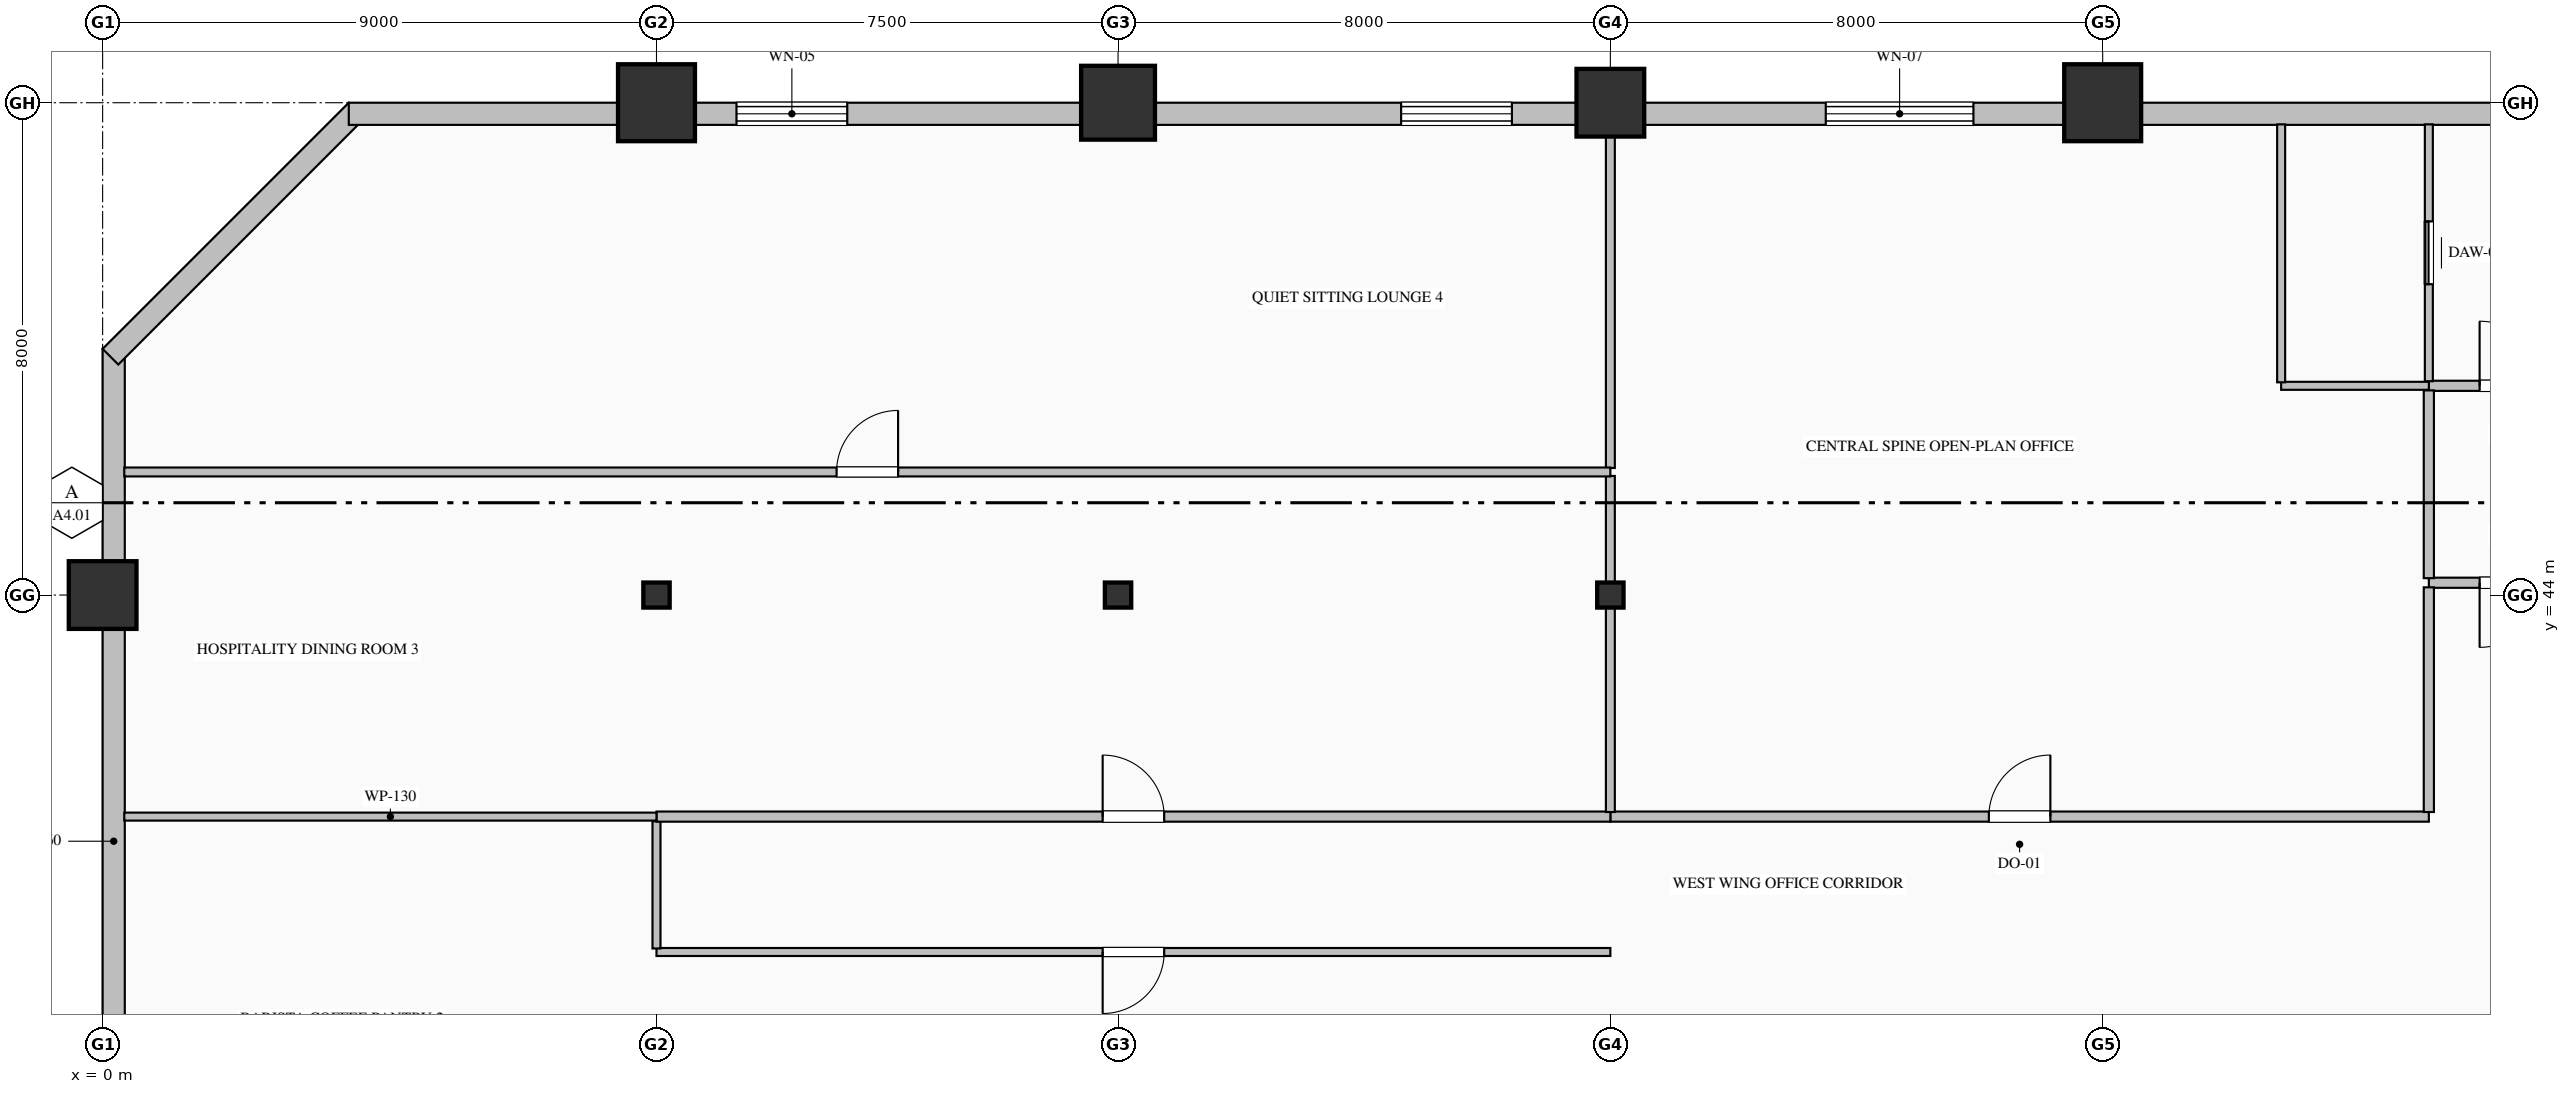
"""IFC4 building model, lengths in metres.
Left out: names, types, materials, properties, quantities, classifications, styles, units other than length and angle.
Written with IfcOpenShell. Run it as: python <this file> out.ifc"""

import sys

from ifc_helpers import new_model, si_unit, direction, frame, frame_2d, origin, origin_2d, place, context, subcontext, project, spatial, rectangle, hollow_rectangle, hollow_circle, i_section, extrude, element, fill, save


model = new_model("IFC4")
c1 = context("Model", 3, precision=1e-05, world=origin(), true_north=direction((0.0, 1.0)))
c2 = subcontext(c1, "Body", "Model", "MODEL_VIEW")
j1 = project(units=[si_unit("LENGTHUNIT", "METRE"), si_unit("PLANEANGLEUNIT", "RADIAN")], contexts=[c1])
p1 = place(None, origin())
s1 = spatial("IfcSite", under=j1, at=p1, CompositionType="ELEMENT")
p2 = place(p1, origin())
s2 = spatial("IfcBuilding", under=s1, at=p2, CompositionType="ELEMENT")
p3 = place(p2, frame((0.0, 0.0, 76.2)))
s3 = spatial("IfcBuildingStorey", under=s2, at=p3, CompositionType="ELEMENT", Elevation=76.2)
p4 = place(p3, frame((0.0, 44.0, 0.0), z_axis=(0.0, 0.0, 1.0), x_axis=(1.0, 0.0, 0.0)))
e1 = element("IfcColumn", 1, at=p4, inside=s3, PredefinedType="COLUMN", context=c2, shape_type="SweptSolid", body=[
    extrude(hollow_rectangle(XDim=1.1, YDim=1.1, WallThickness=0.04, at=origin_2d()), origin(), (0.0, 0.0, 1.0), 4.0),
])
p5 = place(p3, frame((9.0, 44.0, 0.0), z_axis=(0.0, 0.0, 1.0), x_axis=(1.0, 0.0, 0.0)))
e2 = element("IfcColumn", 2, at=p5, inside=s3, PredefinedType="COLUMN", context=c2, shape_type="SweptSolid", body=[
    extrude(i_section(OverallWidth=0.407, OverallDepth=0.428, WebThickness=0.02, FlangeThickness=0.035, FilletRadius=0.022, at=origin_2d()), origin(), (0.0, 0.0, 1.0), 4.0),
])
p6 = place(p3, frame((9.0, 52.0, 0.0), z_axis=(0.0, 0.0, 1.0), x_axis=(1.0, 0.0, 0.0)))
e3 = element("IfcColumn", 3, at=p6, inside=s3, PredefinedType="COLUMN", context=c2, shape_type="SweptSolid", body=[
    extrude(hollow_rectangle(XDim=1.25, YDim=1.25, WallThickness=0.045, at=origin_2d()), origin(), (0.0, 0.0, 1.0), 4.0),
])
p7 = place(p3, frame((16.5, 44.0, 0.0), z_axis=(0.0, 0.0, 1.0), x_axis=(1.0, 0.0, 0.0)))
e4 = element("IfcColumn", 4, at=p7, inside=s3, PredefinedType="COLUMN", context=c2, shape_type="SweptSolid", body=[
    extrude(i_section(OverallWidth=0.407, OverallDepth=0.428, WebThickness=0.02, FlangeThickness=0.035, FilletRadius=0.022, at=origin_2d()), origin(), (0.0, 0.0, 1.0), 4.0),
])
p8 = place(p3, frame((16.5, 52.0, 0.0), z_axis=(0.0, 0.0, 1.0), x_axis=(1.0, 0.0, 0.0)))
e5 = element("IfcColumn", 5, at=p8, inside=s3, PredefinedType="COLUMN", context=c2, shape_type="SweptSolid", body=[
    extrude(hollow_circle(Radius=0.6, WallThickness=0.04, at=origin_2d()), origin(), (0.0, 0.0, 1.0), 4.0),
])
p9 = place(p3, frame((24.5, 44.0, 0.0), z_axis=(0.0, 0.0, 1.0), x_axis=(1.0, 0.0, 0.0)))
e6 = element("IfcColumn", 6, at=p9, inside=s3, PredefinedType="COLUMN", context=c2, shape_type="SweptSolid", body=[
    extrude(i_section(OverallWidth=0.407, OverallDepth=0.428, WebThickness=0.02, FlangeThickness=0.035, FilletRadius=0.022, at=origin_2d()), origin(), (0.0, 0.0, 1.0), 4.0),
])
p10 = place(p3, frame((24.5, 52.0, 0.0), z_axis=(0.0, 0.0, 1.0), x_axis=(1.0, 0.0, 0.0)))
e7 = element("IfcColumn", 7, at=p10, inside=s3, PredefinedType="COLUMN", context=c2, shape_type="SweptSolid", body=[
    extrude(hollow_rectangle(XDim=1.1, YDim=1.1, WallThickness=0.04, at=origin_2d()), origin(), (0.0, 0.0, 1.0), 4.0),
])
p11 = place(p3, frame((32.5, 52.0, 0.0), z_axis=(0.0, 0.0, 1.0), x_axis=(1.0, 0.0, 0.0)))
e8 = element("IfcColumn", 8, at=p11, inside=s3, PredefinedType="COLUMN", context=c2, shape_type="SweptSolid", body=[
    extrude(hollow_rectangle(XDim=1.25, YDim=1.25, WallThickness=0.045, at=origin_2d()), origin(), (0.0, 0.0, 1.0), 4.0),
])
p12 = place(p3, frame((0.18, 32.0, 0.0), z_axis=(0.0, 0.0, 1.0), x_axis=(0.0, 1.0, 0.0)))
e9 = element("IfcWall", 9, at=p12, inside=s3, PredefinedType="SOLIDWALL", context=c2, shape_type="SweptSolid", body=[
    extrude(rectangle(XDim=16.0, YDim=0.36, at=frame_2d((8.0, 0.0))), origin(), (0.0, 0.0, 1.0), 3.25),
])
p13 = place(p3, frame((0.127, 47.873, 0.0), z_axis=(0.0, 0.0, 1.0), x_axis=(0.707106781187, 0.707106781187, 0.0)))
e10 = element("IfcWall", 10, at=p13, inside=s3, PredefinedType="SOLIDWALL", context=c2, shape_type="SweptSolid", body=[
    extrude(rectangle(XDim=5.657, YDim=0.36, at=frame_2d((2.828, 0.0))), origin(), (0.0, 0.0, 1.0), 3.75),
])
p14 = place(p3, frame((4.0, 51.82, 0.0), z_axis=(0.0, 0.0, 1.0), x_axis=(1.0, 0.0, 0.0)))
e11 = element("IfcWall", 11, at=p14, inside=s3, PredefinedType="SOLIDWALL", context=c2, shape_type="SweptSolid", body=[
    extrude(rectangle(XDim=36.52, YDim=0.36, at=frame_2d((18.26, 0.0))), origin(), (0.0, 0.0, 1.0), 3.25),
])
p15 = place(p14, frame((6.3, 0.0, 0.85)))
e12 = element("IfcOpeningElement", 12, at=p15, cuts=e11, PredefinedType="OPENING", context=c2, shape_type="SweptSolid", body=[
    extrude(rectangle(XDim=1.8, YDim=2.05, at=frame_2d((0.9, 1.025))), frame((0.0, 0.19, 0.0), z_axis=(0.0, -1.0, 0.0), x_axis=(1.0, 0.0, 0.0)), (0.0, 0.0, 1.0), 0.38),
])
p16 = place(p14, frame((17.1, 0.0, 0.85)))
e13 = element("IfcOpeningElement", 13, at=p16, cuts=e11, PredefinedType="OPENING", context=c2, shape_type="SweptSolid", body=[
    extrude(rectangle(XDim=1.8, YDim=2.05, at=frame_2d((0.9, 1.025))), frame((0.0, 0.19, 0.0), z_axis=(0.0, -1.0, 0.0), x_axis=(1.0, 0.0, 0.0)), (0.0, 0.0, 1.0), 0.38),
])
p17 = place(p14, frame((24.0, 0.0, 0.8)))
e14 = element("IfcOpeningElement", 14, at=p17, cuts=e11, PredefinedType="OPENING", context=c2, shape_type="SweptSolid", body=[
    extrude(rectangle(XDim=2.4, YDim=2.15, at=frame_2d((1.2, 1.075))), frame((0.0, 0.19, 0.0), z_axis=(0.0, -1.0, 0.0), x_axis=(1.0, 0.0, 0.0)), (0.0, 0.0, 1.0), 0.38),
])
p18 = place(p3, frame((37.8, 47.4, 0.0), z_axis=(0.0, 0.0, 1.0), x_axis=(1.0, 0.0, 0.0)))
e15 = element("IfcWall", 15, at=p18, inside=s3, PredefinedType="PARTITIONING", context=c2, shape_type="SweptSolid", body=[
    extrude(rectangle(XDim=2.7, YDim=0.165, at=frame_2d((1.35, 0.0))), origin(), (0.0, 0.0, 1.0), 3.75),
])
p19 = place(p18, frame((0.825, 0.0, 0.0)))
e16 = element("IfcOpeningElement", 16, at=p19, cuts=e15, PredefinedType="OPENING", context=c2, shape_type="SweptSolid", body=[
    extrude(rectangle(XDim=1.05, YDim=2.15, at=frame_2d((0.525, 1.075))), frame((0.0, 0.093, 0.0), z_axis=(0.0, -1.0, 0.0), x_axis=(1.0, 0.0, 0.0)), (0.0, 0.0, 1.0), 0.185),
])
p20 = place(p3, frame((40.5, 44.2, 0.0), z_axis=(0.0, 0.0, 1.0), x_axis=(-1.0, 0.0, 0.0)))
e17 = element("IfcWall", 17, at=p20, inside=s3, PredefinedType="PARTITIONING", context=c2, shape_type="SweptSolid", body=[
    extrude(rectangle(XDim=2.7, YDim=0.165, at=frame_2d((1.35, 0.0))), origin(), (0.0, 0.0, 1.0), 3.75),
])
p21 = place(p20, frame((0.825, 0.0, 0.0)))
e18 = element("IfcOpeningElement", 18, at=p21, cuts=e17, PredefinedType="OPENING", context=c2, shape_type="SweptSolid", body=[
    extrude(rectangle(XDim=1.05, YDim=2.15, at=frame_2d((0.525, 1.075))), frame((0.0, 0.093, 0.0), z_axis=(0.0, -1.0, 0.0), x_axis=(1.0, 0.0, 0.0)), (0.0, 0.0, 1.0), 0.185),
])
p22 = place(p3, frame((37.8, 44.274, 0.0), z_axis=(0.0, 0.0, 1.0), x_axis=(0.0, 1.0, 0.0)))
e19 = element("IfcWall", 19, at=p22, inside=s3, PredefinedType="PARTITIONING", context=c2, shape_type="SweptSolid", body=[
    extrude(rectangle(XDim=3.051, YDim=0.165, at=frame_2d((1.525, 0.0))), origin(), (0.0, 0.0, 1.0), 3.75),
])
p23 = place(p3, frame((37.8, 47.475, 0.0), z_axis=(0.0, 0.0, 1.0), x_axis=(0.0, 1.0, 0.0)))
e20 = element("IfcWall", 20, at=p23, inside=s3, PredefinedType="PARTITIONING", context=c2, shape_type="SweptSolid", body=[
    extrude(rectangle(XDim=4.173, YDim=0.13, at=frame_2d((2.087, 0.0))), origin(), (0.0, 0.0, 1.0), 3.75),
])
p24 = place(p23, frame((1.577, 0.0, 0.0)))
e21 = element("IfcOpeningElement", 21, at=p24, cuts=e20, PredefinedType="OPENING", context=c2, shape_type="SweptSolid", body=[
    extrude(rectangle(XDim=1.02, YDim=2.15, at=frame_2d((0.51, 1.075))), frame((0.0, 0.075, 0.0), z_axis=(0.0, -1.0, 0.0), x_axis=(1.0, 0.0, 0.0)), (0.0, 0.0, 1.0), 0.15),
])
p25 = place(p3, frame((37.8, 47.4, 0.0), z_axis=(0.0, 0.0, 1.0), x_axis=(-1.0, 0.0, 0.0)))
e22 = element("IfcWall", 22, at=p25, inside=s3, PredefinedType="PARTITIONING", context=c2, shape_type="SweptSolid", body=[
    extrude(rectangle(XDim=2.4, YDim=0.13, at=frame_2d((1.2, 0.0))), origin(), (0.0, 0.0, 1.0), 3.75),
])
p26 = place(p3, frame((35.4, 47.457, 0.0), z_axis=(0.0, 0.0, 1.0), x_axis=(0.0, 1.0, 0.0)))
e23 = element("IfcWall", 23, at=p26, inside=s3, PredefinedType="PARTITIONING", context=c2, shape_type="SweptSolid", body=[
    extrude(rectangle(XDim=4.191, YDim=0.13, at=frame_2d((2.095, 0.0))), origin(), (0.0, 0.0, 1.0), 3.75),
])
p27 = place(p3, frame((24.5, 40.4, 0.0), z_axis=(0.0, 0.0, 1.0), x_axis=(1.0, 0.0, 0.0)))
e24 = element("IfcWall", 24, at=p27, inside=s3, PredefinedType="PARTITIONING", context=c2, shape_type="SweptSolid", body=[
    extrude(rectangle(XDim=13.3, YDim=0.165, at=frame_2d((6.65, 0.0))), origin(), (0.0, 0.0, 1.0), 3.75),
])
p28 = place(p27, frame((6.15, 0.0, 0.0)))
e25 = element("IfcOpeningElement", 25, at=p28, cuts=e24, PredefinedType="OPENING", context=c2, shape_type="SweptSolid", body=[
    extrude(rectangle(XDim=1.0, YDim=2.15, at=frame_2d((0.5, 1.075))), frame((0.0, 0.093, 0.0), z_axis=(0.0, -1.0, 0.0), x_axis=(1.0, 0.0, 0.0)), (0.0, 0.0, 1.0), 0.185),
])
p29 = place(p3, frame((24.5, 38.2, 0.0), z_axis=(0.0, 0.0, 1.0), x_axis=(-1.0, 0.0, 0.0)))
e26 = element("IfcWall", 26, at=p29, inside=s3, PredefinedType="PARTITIONING", context=c2, shape_type="SweptSolid", body=[
    extrude(rectangle(XDim=15.5, YDim=0.13, at=frame_2d((7.75, 0.0))), origin(), (0.0, 0.0, 1.0), 3.75),
])
p30 = place(p29, frame((7.25, 0.0, 0.0)))
e27 = element("IfcOpeningElement", 27, at=p30, cuts=e26, PredefinedType="OPENING", context=c2, shape_type="SweptSolid", body=[
    extrude(rectangle(XDim=1.0, YDim=2.15, at=frame_2d((0.5, 1.075))), frame((0.0, 0.075, 0.0), z_axis=(0.0, -1.0, 0.0), x_axis=(1.0, 0.0, 0.0)), (0.0, 0.0, 1.0), 0.15),
])
p31 = place(p3, frame((9.0, 38.257, 0.0), z_axis=(0.0, 0.0, 1.0), x_axis=(0.0, 1.0, 0.0)))
e28 = element("IfcWall", 28, at=p31, inside=s3, PredefinedType="PARTITIONING", context=c2, shape_type="SweptSolid", body=[
    extrude(rectangle(XDim=2.068, YDim=0.13, at=frame_2d((1.034, 0.0))), origin(), (0.0, 0.0, 1.0), 3.042),
])
p32 = place(p3, frame((9.0, 40.4, 0.0), z_axis=(0.0, 0.0, 1.0), x_axis=(1.0, 0.0, 0.0)))
e29 = element("IfcWall", 29, at=p32, inside=s3, PredefinedType="PARTITIONING", context=c2, shape_type="SweptSolid", body=[
    extrude(rectangle(XDim=15.5, YDim=0.165, at=frame_2d((7.75, 0.0))), origin(), (0.0, 0.0, 1.0), 3.75),
])
p33 = place(p32, frame((7.25, 0.0, 0.0)))
e30 = element("IfcOpeningElement", 30, at=p33, cuts=e29, PredefinedType="OPENING", context=c2, shape_type="SweptSolid", body=[
    extrude(rectangle(XDim=1.0, YDim=2.15, at=frame_2d((0.5, 1.075))), frame((0.0, 0.093, 0.0), z_axis=(0.0, -1.0, 0.0), x_axis=(1.0, 0.0, 0.0)), (0.0, 0.0, 1.0), 0.185),
])
p34 = place(p3, frame((37.8, 40.475, 0.0), z_axis=(0.0, 0.0, 1.0), x_axis=(0.0, 1.0, 0.0)))
e31 = element("IfcWall", 31, at=p34, inside=s3, PredefinedType="PARTITIONING", context=c2, shape_type="SweptSolid", body=[
    extrude(rectangle(XDim=3.651, YDim=0.165, at=frame_2d((1.825, 0.0))), origin(), (0.0, 0.0, 1.0), 3.75),
])
p35 = place(p3, frame((24.5, 40.475, 0.0), z_axis=(0.0, 0.0, 1.0), x_axis=(0.0, 1.0, 0.0)))
e32 = element("IfcWall", 32, at=p35, inside=s3, PredefinedType="PARTITIONING", context=c2, shape_type="SweptSolid", body=[
    extrude(rectangle(XDim=5.461, YDim=0.145, at=frame_2d((2.73, 0.0))), origin(), (0.0, 0.0, 1.0), 3.042),
])
p36 = place(p3, frame((24.5, 46.064, 0.0), z_axis=(0.0, 0.0, 1.0), x_axis=(0.0, 1.0, 0.0)))
e33 = element("IfcWall", 33, at=p36, inside=s3, PredefinedType="PARTITIONING", context=c2, shape_type="SweptSolid", body=[
    extrude(rectangle(XDim=5.583, YDim=0.145, at=frame_2d((2.792, 0.0))), origin(), (0.0, 0.0, 1.0), 3.042),
])
p37 = place(p3, frame((0.352, 40.4, 0.0), z_axis=(0.0, 0.0, 1.0), x_axis=(1.0, 0.0, 0.0)))
e34 = element("IfcWall", 34, at=p37, inside=s3, PredefinedType="PARTITIONING", context=c2, shape_type="SweptSolid", body=[
    extrude(rectangle(XDim=8.648, YDim=0.13, at=frame_2d((4.324, 0.0))), origin(), (0.0, 0.0, 1.0), 3.75),
])
p38 = place(p3, frame((0.352, 46.0, 0.0), z_axis=(0.0, 0.0, 1.0), x_axis=(1.0, 0.0, 0.0)))
e35 = element("IfcWall", 35, at=p38, inside=s3, PredefinedType="PARTITIONING", context=c2, shape_type="SweptSolid", body=[
    extrude(rectangle(XDim=24.148, YDim=0.145, at=frame_2d((12.074, 0.0))), origin(), (0.0, 0.0, 1.0), 3.75),
])
p39 = place(p38, frame((11.574, 0.0, 0.0)))
e36 = element("IfcOpeningElement", 36, at=p39, cuts=e35, PredefinedType="OPENING", context=c2, shape_type="SweptSolid", body=[
    extrude(rectangle(XDim=1.0, YDim=2.15, at=frame_2d((0.5, 1.075))), frame((0.0, 0.083, 0.0), z_axis=(0.0, -1.0, 0.0), x_axis=(1.0, 0.0, 0.0)), (0.0, 0.0, 1.0), 0.165),
])
p40 = place(p15, origin())
e37 = element("IfcWindow", 37, at=p40, inside=s3, PartitioningType="TRIPLE_PANEL_VERTICAL", PredefinedType="WINDOW", context=c2, shape_type="SweptSolid", body=[
    extrude(rectangle(XDim=1.8, YDim=2.05, at=frame_2d((0.9, 1.025))), frame((0.0, 0.15, 0.0), z_axis=(0.0, -1.0, 0.0), x_axis=(1.0, 0.0, 0.0)), (0.0, 0.0, 1.0), 0.06),
])
fill(e12, e37)
p41 = place(p16, origin())
e38 = element("IfcWindow", 38, at=p41, inside=s3, PartitioningType="TRIPLE_PANEL_VERTICAL", PredefinedType="WINDOW", context=c2, shape_type="SweptSolid", body=[
    extrude(rectangle(XDim=1.8, YDim=2.05, at=frame_2d((0.9, 1.025))), frame((0.0, 0.15, 0.0), z_axis=(0.0, -1.0, 0.0), x_axis=(1.0, 0.0, 0.0)), (0.0, 0.0, 1.0), 0.06),
])
fill(e13, e38)
p42 = place(p17, origin())
e39 = element("IfcWindow", 39, at=p42, inside=s3, PartitioningType="TRIPLE_PANEL_VERTICAL", PredefinedType="WINDOW", context=c2, shape_type="SweptSolid", body=[
    extrude(rectangle(XDim=2.4, YDim=2.15, at=frame_2d((1.2, 1.075))), frame((0.0, 0.15, 0.0), z_axis=(0.0, -1.0, 0.0), x_axis=(1.0, 0.0, 0.0)), (0.0, 0.0, 1.0), 0.06),
])
fill(e14, e39)
p43 = place(p19, origin())
e40 = element("IfcDoor", 40, at=p43, inside=s3, OperationType="SINGLE_SWING_LEFT", PredefinedType="DOOR", context=c2, shape_type="SweptSolid", body=[
    extrude(rectangle(XDim=1.05, YDim=2.15, at=frame_2d((0.525, 1.075))), frame((0.0, 0.025, 0.0), z_axis=(0.0, -1.0, 0.0), x_axis=(1.0, 0.0, 0.0)), (0.0, 0.0, 1.0), 0.05),
])
fill(e16, e40)
p44 = place(p21, origin())
e41 = element("IfcDoor", 41, at=p44, inside=s3, OperationType="SINGLE_SWING_RIGHT", PredefinedType="DOOR", context=c2, shape_type="SweptSolid", body=[
    extrude(rectangle(XDim=1.05, YDim=2.15, at=frame_2d((0.525, 1.075))), frame((0.0, 0.025, 0.0), z_axis=(0.0, -1.0, 0.0), x_axis=(1.0, 0.0, 0.0)), (0.0, 0.0, 1.0), 0.05),
])
fill(e18, e41)
p45 = place(p24, origin())
e42 = element("IfcDoor", 42, at=p45, inside=s3, OperationType="SLIDING_TO_LEFT", PredefinedType="DOOR", context=c2, shape_type="SweptSolid", body=[
    extrude(rectangle(XDim=1.02, YDim=2.15, at=frame_2d((0.51, 1.075))), frame((0.0, 0.025, 0.0), z_axis=(0.0, -1.0, 0.0), x_axis=(1.0, 0.0, 0.0)), (0.0, 0.0, 1.0), 0.05),
])
fill(e21, e42)
p46 = place(p28, origin())
e43 = element("IfcDoor", 43, at=p46, inside=s3, OperationType="SINGLE_SWING_RIGHT", PredefinedType="DOOR", context=c2, shape_type="SweptSolid", body=[
    extrude(rectangle(XDim=1.0, YDim=2.15, at=frame_2d((0.5, 1.075))), frame((0.0, 0.025, 0.0), z_axis=(0.0, -1.0, 0.0), x_axis=(1.0, 0.0, 0.0)), (0.0, 0.0, 1.0), 0.05),
])
fill(e25, e43)
p47 = place(p30, origin())
e44 = element("IfcDoor", 44, at=p47, inside=s3, OperationType="SINGLE_SWING_RIGHT", PredefinedType="DOOR", context=c2, shape_type="SweptSolid", body=[
    extrude(rectangle(XDim=1.0, YDim=2.15, at=frame_2d((0.5, 1.075))), frame((0.0, 0.025, 0.0), z_axis=(0.0, -1.0, 0.0), x_axis=(1.0, 0.0, 0.0)), (0.0, 0.0, 1.0), 0.05),
])
fill(e27, e44)
p48 = place(p33, origin())
e45 = element("IfcDoor", 45, at=p48, inside=s3, OperationType="SINGLE_SWING_LEFT", PredefinedType="DOOR", context=c2, shape_type="SweptSolid", body=[
    extrude(rectangle(XDim=1.0, YDim=2.15, at=frame_2d((0.5, 1.075))), frame((0.0, 0.025, 0.0), z_axis=(0.0, -1.0, 0.0), x_axis=(1.0, 0.0, 0.0)), (0.0, 0.0, 1.0), 0.05),
])
fill(e30, e45)
p49 = place(p39, origin())
e46 = element("IfcDoor", 46, at=p49, inside=s3, OperationType="SINGLE_SWING_RIGHT", PredefinedType="DOOR", context=c2, shape_type="SweptSolid", body=[
    extrude(rectangle(XDim=1.0, YDim=2.15, at=frame_2d((0.5, 1.075))), frame((0.0, 0.025, 0.0), z_axis=(0.0, -1.0, 0.0), x_axis=(1.0, 0.0, 0.0)), (0.0, 0.0, 1.0), 0.05),
])
fill(e36, e46)
save(model, sys.argv[1])
